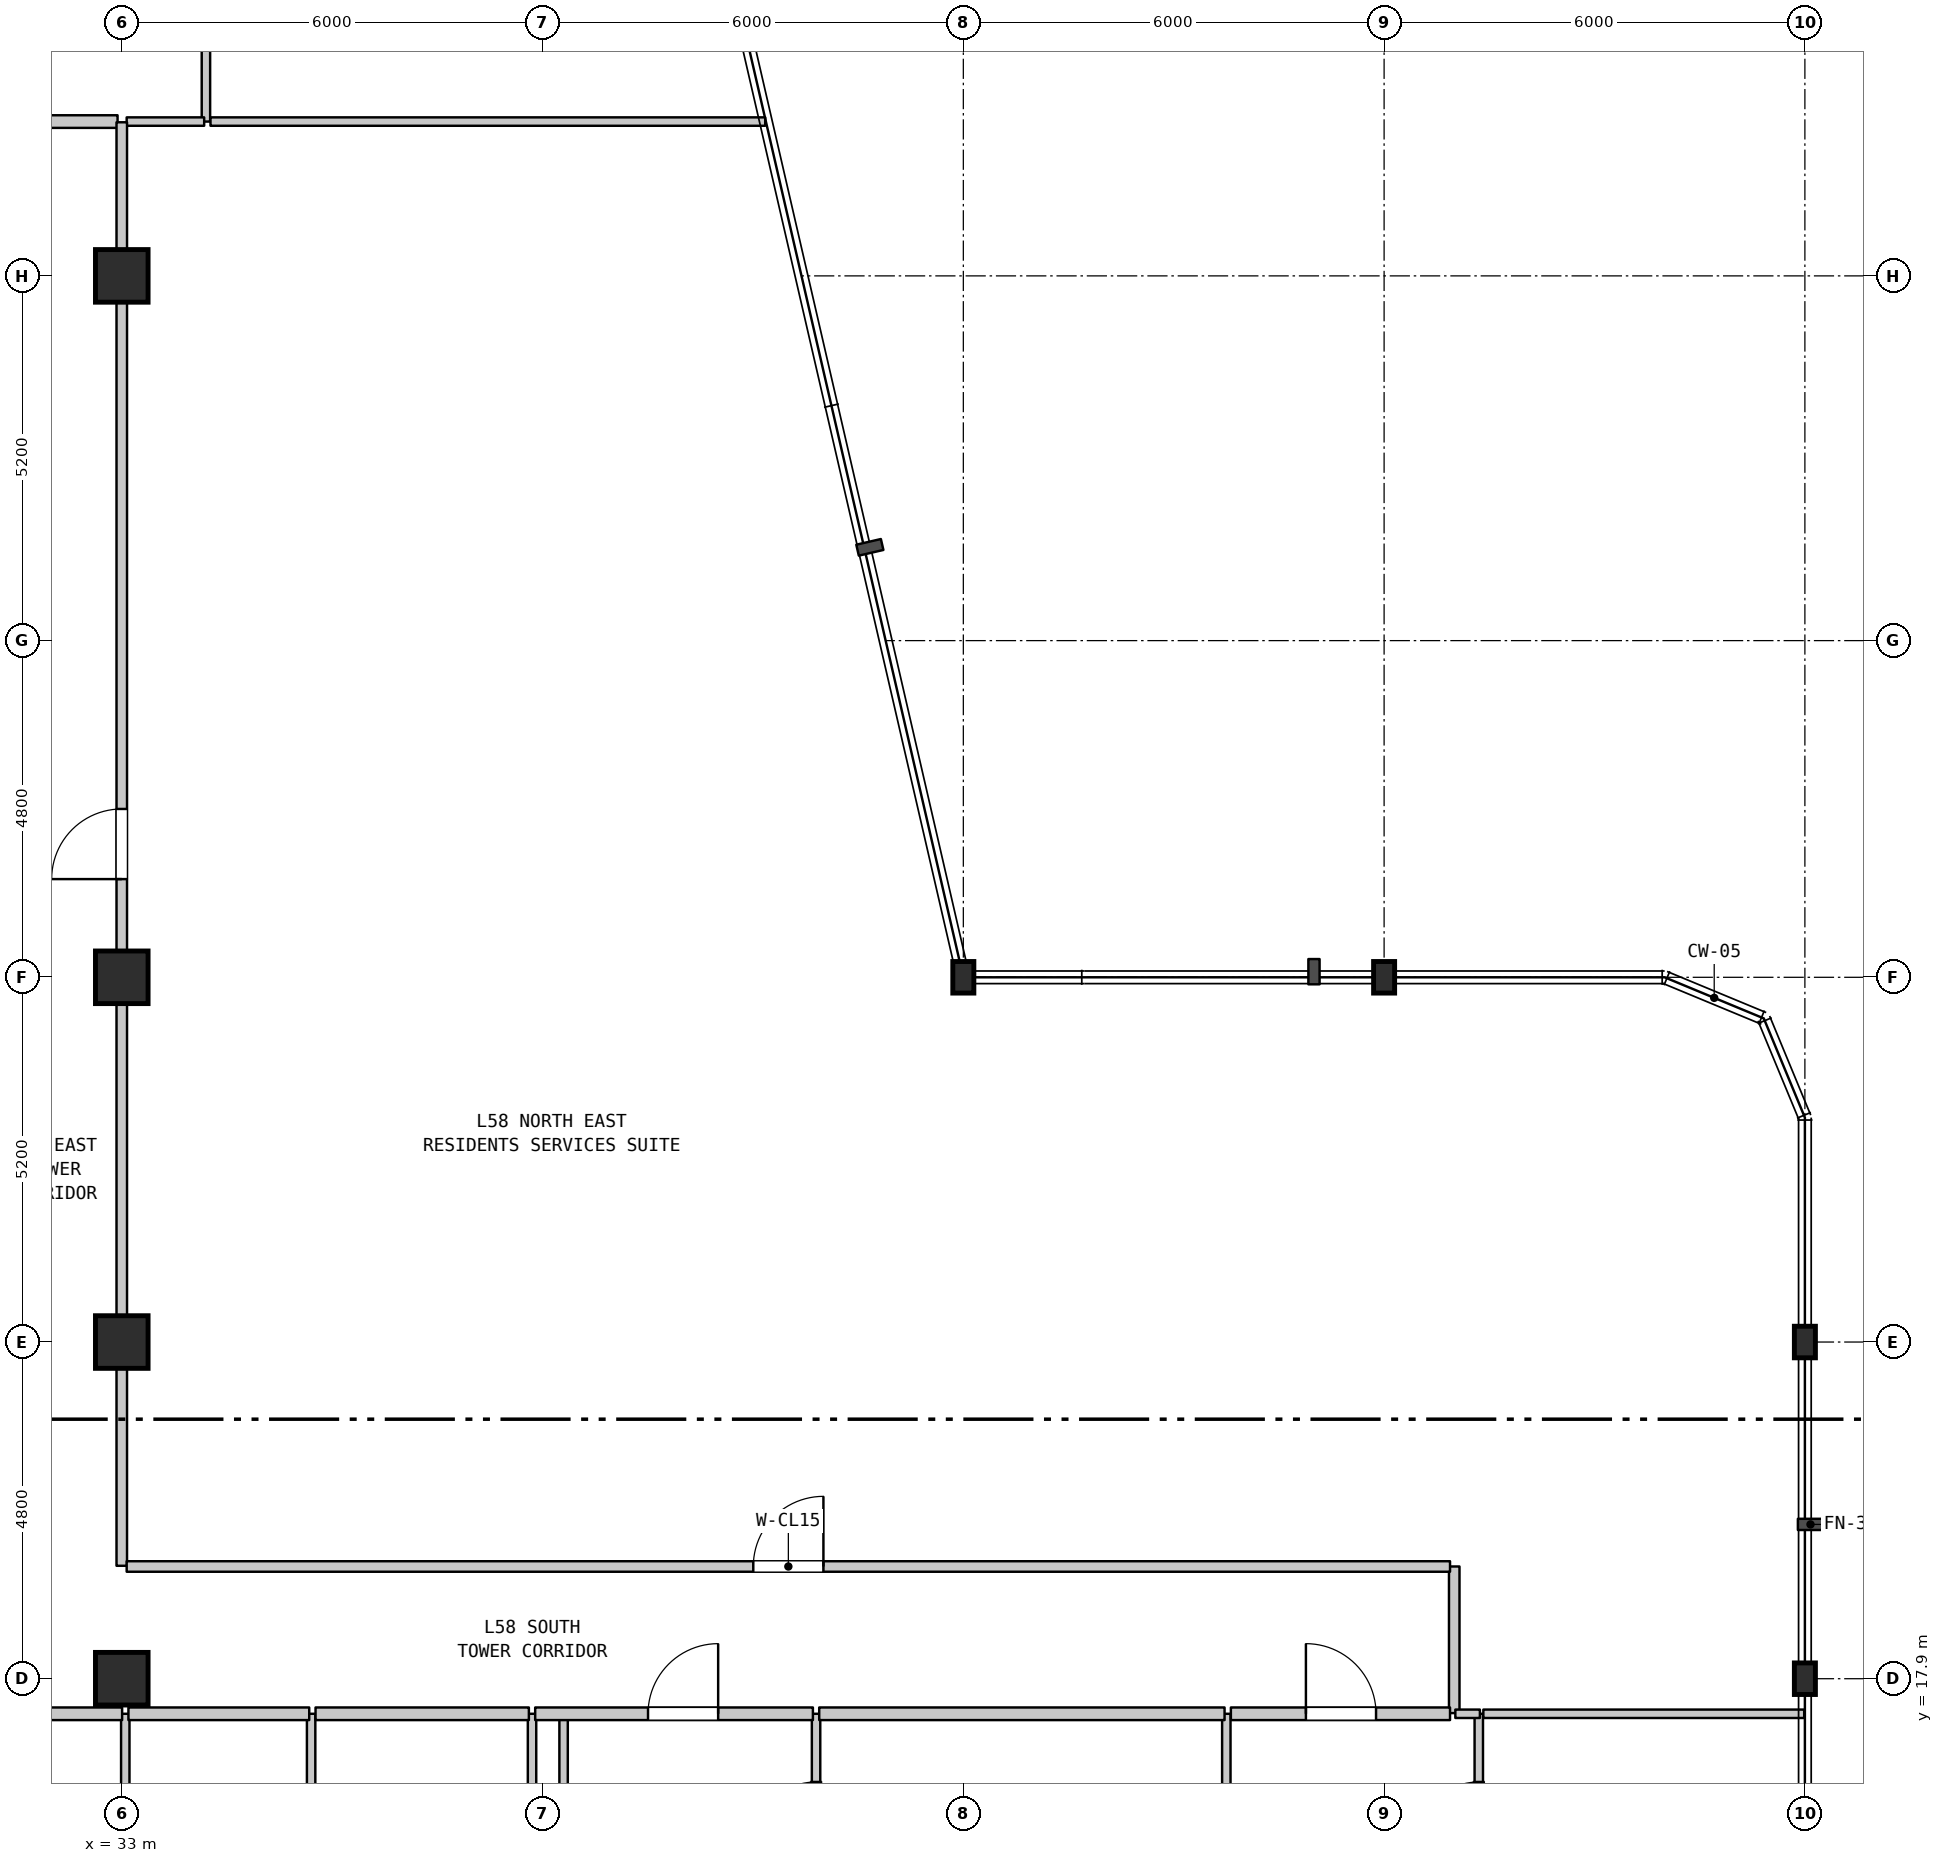
"""IFC4 building model, lengths in metres.
Left out: names, types, materials, properties, quantities, classifications, styles, units other than length and angle.
Written with IfcOpenShell. Run it as: python <this file> out.ifc"""

import sys

from ifc_helpers import new_model, si_unit, direction, frame, frame_2d, origin, origin_2d, place, context, subcontext, project, spatial, rectangle, i_section, extrude, element, fill, save


model = new_model("IFC4")
c1 = context("Model", 3, precision=1e-05, world=origin(), true_north=direction((0.0, 1.0)))
c2 = subcontext(c1, "Body", "Model", "MODEL_VIEW")
j1 = project(units=[si_unit("LENGTHUNIT", "METRE"), si_unit("PLANEANGLEUNIT", "RADIAN")], contexts=[c1])
p1 = place(None, origin())
s1 = spatial("IfcSite", under=j1, at=p1, CompositionType="ELEMENT")
p2 = place(p1, origin())
s2 = spatial("IfcBuilding", under=s1, at=p2, CompositionType="ELEMENT")
p3 = place(p2, frame((0.0, 0.0, 233.9)))
s3 = spatial("IfcBuildingStorey", under=s2, at=p3, CompositionType="ELEMENT", Elevation=233.9)
for number, where, z_axis, x_axis in (
    (1, (33.0, 17.9, 0.0), (0.0, 0.0, 1.0), (1.0, 0.0, 0.0)),
    (2, (33.0, 22.7, 0.0), (0.0, 0.0, 1.0), (1.0, 0.0, 0.0)),
    (3, (33.0, 27.9, 0.0), (0.0, 0.0, 1.0), (1.0, 0.0, 0.0)),
    (4, (33.0, 37.9, 0.0), (0.0, 0.0, 1.0), (1.0, 0.0, 0.0)),
):
    element("IfcColumn", number, at=place(p3, frame(where, z_axis=z_axis, x_axis=x_axis)), inside=s3, PredefinedType="COLUMN", context=c2, shape_type="SweptSolid", body=[
        extrude(rectangle(XDim=0.75, YDim=0.75, at=origin_2d()), origin(), (0.0, 0.0, 1.0), 3.7),
    ])
for number, where, z_axis, x_axis in (
    (5, (45.0, 27.9, 0.0), (0.0, 0.0, 1.0), (1.0, 0.0, 0.0)),
    (6, (51.0, 27.9, 0.0), (0.0, 0.0, 1.0), (1.0, 0.0, 0.0)),
    (7, (57.0, 17.9, 0.0), (0.0, 0.0, 1.0), (1.0, 0.0, 0.0)),
    (8, (57.0, 22.7, 0.0), (0.0, 0.0, 1.0), (1.0, 0.0, 0.0)),
):
    element("IfcColumn", number, at=place(p3, frame(where, z_axis=z_axis, x_axis=x_axis)), inside=s3, PredefinedType="COLUMN", context=c2, shape_type="SweptSolid", body=[
        extrude(i_section(OverallWidth=0.3, OverallDepth=0.45, WebThickness=0.014, FlangeThickness=0.026, FilletRadius=0.027, at=origin_2d()), origin(), (0.0, 0.0, 1.0), 3.7),
    ])
p4 = place(p3, frame((33.0, 19.51, 0.0), z_axis=(0.0, 0.0, 1.0), x_axis=(0.0, 1.0, 0.0)))
e9 = element("IfcWall", 9, at=p4, inside=s3, PredefinedType="STANDARD", context=c2, shape_type="SweptSolid", body=[
    extrude(rectangle(XDim=18.39, YDim=0.15, at=frame_2d((9.195, 0.0))), origin(), (0.0, 0.0, 1.0), 2.78),
])
p5 = place(p4, frame((9.79, 0.0, 0.0)))
e10 = element("IfcOpeningElement", 10, at=p5, cuts=e9, PredefinedType="OPENING", context=c2, shape_type="SweptSolid", body=[
    extrude(rectangle(XDim=1.0, YDim=2.15, at=frame_2d((0.5, 1.075))), frame((0.0, 0.085, 0.0), z_axis=(0.0, -1.0, 0.0), x_axis=(1.0, 0.0, 0.0)), (0.0, 0.0, 1.0), 0.17),
])
p6 = place(p3, frame((33.05, 11.15, 0.0), z_axis=(0.0, 0.0, 1.0), x_axis=(0.0, 1.0, 0.0)))
e11 = element("IfcWall", 11, at=p6, inside=s3, PredefinedType="PARTITIONING", context=c2, shape_type="SweptSolid", body=[
    extrude(rectangle(XDim=6.25, YDim=0.12, at=frame_2d((3.125, 0.0))), origin(), (0.0, 0.0, 1.0), 2.78),
])
p7 = place(p3, frame((34.2, 40.1, 0.0), z_axis=(0.0, 0.0, 1.0), x_axis=(0.0, 1.0, 0.0)))
e12 = element("IfcWall", 12, at=p7, inside=s3, PredefinedType="PARTITIONING", context=c2, shape_type="SweptSolid", body=[
    extrude(rectangle(XDim=13.79, YDim=0.12, at=frame_2d((6.895, 0.0))), origin(), (0.0, 0.0, 1.0), 3.28),
])
p8 = place(p7, frame((1.852, 0.0, 0.0)))
e13 = element("IfcOpeningElement", 13, at=p8, cuts=e12, PredefinedType="OPENING", context=c2, shape_type="SweptSolid", body=[
    extrude(rectangle(XDim=0.9, YDim=2.15, at=frame_2d((0.45, 1.075))), frame((0.0, 0.07, 0.0), z_axis=(0.0, -1.0, 0.0), x_axis=(1.0, 0.0, 0.0)), (0.0, 0.0, 1.0), 0.14),
])
p9 = place(p7, frame((6.45, 0.0, 0.0)))
e14 = element("IfcOpeningElement", 14, at=p9, cuts=e12, PredefinedType="OPENING", context=c2, shape_type="SweptSolid", body=[
    extrude(rectangle(XDim=0.9, YDim=2.15, at=frame_2d((0.45, 1.075))), frame((0.0, 0.07, 0.0), z_axis=(0.0, -1.0, 0.0), x_axis=(1.0, 0.0, 0.0)), (0.0, 0.0, 1.0), 0.14),
])
p10 = place(p7, frame((10.898, 0.0, 0.0)))
e15 = element("IfcOpeningElement", 15, at=p10, cuts=e12, PredefinedType="OPENING", context=c2, shape_type="SweptSolid", body=[
    extrude(rectangle(XDim=0.9, YDim=2.15, at=frame_2d((0.45, 1.075))), frame((0.0, 0.07, 0.0), z_axis=(0.0, -1.0, 0.0), x_axis=(1.0, 0.0, 0.0)), (0.0, 0.0, 1.0), 0.14),
])
for number, where, z_axis, x_axis in (
    (16, (35.7, 11.15, 0.0), (0.0, 0.0, 1.0), (0.0, 1.0, 0.0)),
    (17, (38.85, 11.15, 0.0), (0.0, 0.0, 1.0), (0.0, 1.0, 0.0)),
):
    element("IfcWall", number, at=place(p3, frame(where, z_axis=z_axis, x_axis=x_axis)), inside=s3, PredefinedType="PARTITIONING", context=c2, shape_type="SweptSolid", body=[
        extrude(rectangle(XDim=6.25, YDim=0.12, at=frame_2d((3.125, 0.0))), origin(), (0.0, 0.0, 1.0), 3.28),
    ])
p11 = place(p3, frame((39.3, 0.71, 0.0), z_axis=(0.0, 0.0, 1.0), x_axis=(0.0, 1.0, 0.0)))
e18 = element("IfcWall", 18, at=p11, inside=s3, PredefinedType="PARTITIONING", context=c2, shape_type="SweptSolid", body=[
    extrude(rectangle(XDim=16.69, YDim=0.12, at=frame_2d((8.345, 0.0))), origin(), (0.0, 0.0, 1.0), 3.28),
])
p12 = place(p3, frame((42.9, 14.7, 0.0), z_axis=(0.0, 0.0, 1.0), x_axis=(0.0, 1.0, 0.0)))
e19 = element("IfcWall", 19, at=p12, inside=s3, PredefinedType="PARTITIONING", context=c2, shape_type="SweptSolid", body=[
    extrude(rectangle(XDim=2.7, YDim=0.12, at=frame_2d((1.35, 0.0))), origin(), (0.0, 0.0, 1.0), 3.28),
])
p13 = place(p12, frame((0.828, 0.0, 0.0)))
e20 = element("IfcOpeningElement", 20, at=p13, cuts=e19, PredefinedType="OPENING", context=c2, shape_type="SweptSolid", body=[
    extrude(rectangle(XDim=0.9, YDim=2.1, at=frame_2d((0.45, 1.05))), frame((0.0, 0.07, 0.0), z_axis=(0.0, -1.0, 0.0), x_axis=(1.0, 0.0, 0.0)), (0.0, 0.0, 1.0), 0.14),
])
p14 = place(p3, frame((48.75, 14.7, 0.0), z_axis=(0.0, 0.0, 1.0), x_axis=(0.0, 1.0, 0.0)))
e21 = element("IfcWall", 21, at=p14, inside=s3, PredefinedType="PARTITIONING", context=c2, shape_type="SweptSolid", body=[
    extrude(rectangle(XDim=2.7, YDim=0.12, at=frame_2d((1.35, 0.0))), origin(), (0.0, 0.0, 1.0), 3.28),
])
p15 = place(p3, frame((52.0, 17.41, 0.0), z_axis=(0.0, 0.0, 1.0), x_axis=(0.0, 1.0, 0.0)))
e22 = element("IfcWall", 22, at=p15, inside=s3, PredefinedType="STANDARD", context=c2, shape_type="SweptSolid", body=[
    extrude(rectangle(XDim=2.09, YDim=0.15, at=frame_2d((1.045, 0.0))), origin(), (0.0, 0.0, 1.0), 3.28),
])
p16 = place(p3, frame((52.35, 14.7, 0.0), z_axis=(0.0, 0.0, 1.0), x_axis=(0.0, 1.0, 0.0)))
e23 = element("IfcWall", 23, at=p16, inside=s3, PredefinedType="PARTITIONING", context=c2, shape_type="SweptSolid", body=[
    extrude(rectangle(XDim=2.7, YDim=0.12, at=frame_2d((1.35, 0.0))), origin(), (0.0, 0.0, 1.0), 3.28),
])
p17 = place(p16, frame((0.828, 0.0, 0.0)))
e24 = element("IfcOpeningElement", 24, at=p17, cuts=e23, PredefinedType="OPENING", context=c2, shape_type="SweptSolid", body=[
    extrude(rectangle(XDim=0.9, YDim=2.1, at=frame_2d((0.45, 1.05))), frame((0.0, 0.07, 0.0), z_axis=(0.0, -1.0, 0.0), x_axis=(1.0, 0.0, 0.0)), (0.0, 0.0, 1.0), 0.14),
])
p18 = place(p3, frame((29.045, 17.4, 0.0), z_axis=(0.0, 0.0, 1.0), x_axis=(1.0, 0.0, 0.0)))
e25 = element("IfcWall", 25, at=p18, inside=s3, PredefinedType="STANDARD", context=c2, shape_type="SweptSolid", body=[
    extrude(rectangle(XDim=3.96, YDim=0.18, at=frame_2d((1.98, 0.0))), origin(), (0.0, 0.0, 1.0), 3.28),
])
p19 = place(p18, frame((1.48, 0.0, 0.0)))
e26 = element("IfcOpeningElement", 26, at=p19, cuts=e25, PredefinedType="OPENING", context=c2, shape_type="SweptSolid", body=[
    extrude(rectangle(XDim=1.0, YDim=2.15, at=frame_2d((0.5, 1.075))), frame((0.0, 0.1, 0.0), z_axis=(0.0, -1.0, 0.0), x_axis=(1.0, 0.0, 0.0)), (0.0, 0.0, 1.0), 0.2),
])
p20 = place(p3, frame((33.095, 17.4, 0.0), z_axis=(0.0, 0.0, 1.0), x_axis=(1.0, 0.0, 0.0)))
e27 = element("IfcWall", 27, at=p20, inside=s3, PredefinedType="STANDARD", context=c2, shape_type="SweptSolid", body=[
    extrude(rectangle(XDim=2.578, YDim=0.18, at=frame_2d((1.289, 0.0))), origin(), (0.0, 0.0, 1.0), 3.28),
])
p21 = place(p3, frame((35.763, 17.4, 0.0), z_axis=(0.0, 0.0, 1.0), x_axis=(1.0, 0.0, 0.0)))
e28 = element("IfcWall", 28, at=p21, inside=s3, PredefinedType="STANDARD", context=c2, shape_type="SweptSolid", body=[
    extrude(rectangle(XDim=3.042, YDim=0.18, at=frame_2d((1.521, 0.0))), origin(), (0.0, 0.0, 1.0), 3.28),
])
p22 = place(p3, frame((38.895, 17.4, 0.0), z_axis=(0.0, 0.0, 1.0), x_axis=(1.0, 0.0, 0.0)))
e29 = element("IfcWall", 29, at=p22, inside=s3, PredefinedType="STANDARD", context=c2, shape_type="SweptSolid", body=[
    extrude(rectangle(XDim=3.96, YDim=0.18, at=frame_2d((1.98, 0.0))), origin(), (0.0, 0.0, 1.0), 3.28),
])
p23 = place(p22, frame((1.609, 0.0, 0.0)))
e30 = element("IfcOpeningElement", 30, at=p23, cuts=e29, PredefinedType="OPENING", context=c2, shape_type="SweptSolid", body=[
    extrude(rectangle(XDim=1.0, YDim=2.15, at=frame_2d((0.5, 1.075))), frame((0.0, 0.1, 0.0), z_axis=(0.0, -1.0, 0.0), x_axis=(1.0, 0.0, 0.0)), (0.0, 0.0, 1.0), 0.2),
])
p24 = place(p3, frame((42.945, 17.4, 0.0), z_axis=(0.0, 0.0, 1.0), x_axis=(1.0, 0.0, 0.0)))
e31 = element("IfcWall", 31, at=p24, inside=s3, PredefinedType="STANDARD", context=c2, shape_type="SweptSolid", body=[
    extrude(rectangle(XDim=5.78, YDim=0.18, at=frame_2d((2.89, 0.0))), origin(), (0.0, 0.0, 1.0), 3.28),
])
p25 = place(p3, frame((48.815, 17.4, 0.0), z_axis=(0.0, 0.0, 1.0), x_axis=(1.0, 0.0, 0.0)))
e32 = element("IfcWall", 32, at=p25, inside=s3, PredefinedType="STANDARD", context=c2, shape_type="SweptSolid", body=[
    extrude(rectangle(XDim=3.125, YDim=0.18, at=frame_2d((1.562, 0.0))), origin(), (0.0, 0.0, 1.0), 3.28),
])
p26 = place(p25, frame((1.07, 0.0, 0.0)))
e33 = element("IfcOpeningElement", 33, at=p26, cuts=e32, PredefinedType="OPENING", context=c2, shape_type="SweptSolid", body=[
    extrude(rectangle(XDim=1.0, YDim=2.15, at=frame_2d((0.5, 1.075))), frame((0.0, 0.1, 0.0), z_axis=(0.0, -1.0, 0.0), x_axis=(1.0, 0.0, 0.0)), (0.0, 0.0, 1.0), 0.2),
])
p27 = place(p3, frame((52.016, 17.4, 0.0), z_axis=(0.0, 0.0, 1.0), x_axis=(1.0, 0.0, 0.0)))
e34 = element("IfcWall", 34, at=p27, inside=s3, PredefinedType="PARTITIONING", context=c2, shape_type="SweptSolid", body=[
    extrude(rectangle(XDim=0.35, YDim=0.12, at=frame_2d((0.175, 0.0))), origin(), (0.0, 0.0, 1.0), 3.28),
])
p28 = place(p3, frame((52.415, 17.4, 0.0), z_axis=(0.0, 0.0, 1.0), x_axis=(1.0, 0.0, 0.0)))
e35 = element("IfcWall", 35, at=p28, inside=s3, PredefinedType="PARTITIONING", context=c2, shape_type="SweptSolid", body=[
    extrude(rectangle(XDim=4.575, YDim=0.12, at=frame_2d((2.288, 0.0))), origin(), (0.0, 0.0, 1.0), 3.28),
])
p29 = place(p3, frame((33.07, 19.5, 0.0), z_axis=(0.0, 0.0, 1.0), x_axis=(1.0, 0.0, 0.0)))
e36 = element("IfcWall", 36, at=p29, inside=s3, PredefinedType="STANDARD", context=c2, shape_type="SweptSolid", body=[
    extrude(rectangle(XDim=18.87, YDim=0.15, at=frame_2d((9.435, 0.0))), origin(), (0.0, 0.0, 1.0), 3.28),
])
p30 = place(p29, frame((8.935, 0.0, 0.0)))
e37 = element("IfcOpeningElement", 37, at=p30, cuts=e36, PredefinedType="OPENING", context=c2, shape_type="SweptSolid", body=[
    extrude(rectangle(XDim=1.0, YDim=2.15, at=frame_2d((0.5, 1.075))), frame((0.0, 0.085, 0.0), z_axis=(0.0, -1.0, 0.0), x_axis=(1.0, 0.0, 0.0)), (0.0, 0.0, 1.0), 0.17),
])
p31 = place(p3, frame((29.195, 40.1, 0.0), z_axis=(0.0, 0.0, 1.0), x_axis=(1.0, 0.0, 0.0)))
e38 = element("IfcWall", 38, at=p31, inside=s3, PredefinedType="STANDARD", context=c2, shape_type="SweptSolid", body=[
    extrude(rectangle(XDim=3.745, YDim=0.18, at=frame_2d((1.873, 0.0))), origin(), (0.0, 0.0, 1.0), 3.28),
])
p32 = place(p3, frame((33.07, 40.1, 0.0), z_axis=(0.0, 0.0, 1.0), x_axis=(1.0, 0.0, 0.0)))
e39 = element("IfcWall", 39, at=p32, inside=s3, PredefinedType="PARTITIONING", context=c2, shape_type="SweptSolid", body=[
    extrude(rectangle(XDim=1.105, YDim=0.12, at=frame_2d((0.552, 0.0))), origin(), (0.0, 0.0, 1.0), 3.28),
])
p33 = place(p3, frame((34.265, 40.1, 0.0), z_axis=(0.0, 0.0, 1.0), x_axis=(1.0, 0.0, 0.0)))
e40 = element("IfcWall", 40, at=p33, inside=s3, PredefinedType="PARTITIONING", context=c2, shape_type="SweptSolid", body=[
    extrude(rectangle(XDim=7.91, YDim=0.12, at=frame_2d((3.955, 0.0))), origin(), (0.0, 0.0, 1.0), 3.28),
])
p34 = place(p3, frame((33.0, 37.9, 0.0), z_axis=(0.0, 0.0, 1.0), x_axis=(0.0, 1.0, 0.0)))
e41 = element("IfcWall", 41, at=p34, inside=s3, PredefinedType="STANDARD", context=c2, shape_type="SweptSolid", body=[
    extrude(rectangle(XDim=2.19, YDim=0.15, at=frame_2d((1.095, 0.0))), origin(), (0.0, 0.0, 1.0), 2.68),
])
p35 = place(p5, origin())
e42 = element("IfcDoor", 42, at=p35, inside=s3, OperationType="SINGLE_SWING_LEFT", PredefinedType="DOOR", context=c2, shape_type="SweptSolid", body=[
    extrude(rectangle(XDim=1.0, YDim=2.15, at=frame_2d((0.5, 1.075))), frame((0.0, 0.025, 0.0), z_axis=(0.0, -1.0, 0.0), x_axis=(1.0, 0.0, 0.0)), (0.0, 0.0, 1.0), 0.05),
])
fill(e10, e42)
p36 = place(p13, origin())
e43 = element("IfcDoor", 43, at=p36, inside=s3, OperationType="SINGLE_SWING_LEFT", PredefinedType="DOOR", context=c2, shape_type="SweptSolid", body=[
    extrude(rectangle(XDim=0.9, YDim=2.1, at=frame_2d((0.45, 1.05))), frame((0.0, 0.025, 0.0), z_axis=(0.0, -1.0, 0.0), x_axis=(1.0, 0.0, 0.0)), (0.0, 0.0, 1.0), 0.05),
])
fill(e20, e43)
p37 = place(p17, origin())
e44 = element("IfcDoor", 44, at=p37, inside=s3, OperationType="SINGLE_SWING_LEFT", PredefinedType="DOOR", context=c2, shape_type="SweptSolid", body=[
    extrude(rectangle(XDim=0.9, YDim=2.1, at=frame_2d((0.45, 1.05))), frame((0.0, 0.025, 0.0), z_axis=(0.0, -1.0, 0.0), x_axis=(1.0, 0.0, 0.0)), (0.0, 0.0, 1.0), 0.05),
])
fill(e24, e44)
p38 = place(p23, origin())
e45 = element("IfcDoor", 45, at=p38, inside=s3, OperationType="SINGLE_SWING_RIGHT", PredefinedType="DOOR", context=c2, shape_type="SweptSolid", body=[
    extrude(rectangle(XDim=1.0, YDim=2.15, at=frame_2d((0.5, 1.075))), frame((0.0, 0.025, 0.0), z_axis=(0.0, -1.0, 0.0), x_axis=(1.0, 0.0, 0.0)), (0.0, 0.0, 1.0), 0.05),
])
fill(e30, e45)
p39 = place(p26, origin())
e46 = element("IfcDoor", 46, at=p39, inside=s3, OperationType="SINGLE_SWING_LEFT", PredefinedType="DOOR", context=c2, shape_type="SweptSolid", body=[
    extrude(rectangle(XDim=1.0, YDim=2.15, at=frame_2d((0.5, 1.075))), frame((0.0, 0.025, 0.0), z_axis=(0.0, -1.0, 0.0), x_axis=(1.0, 0.0, 0.0)), (0.0, 0.0, 1.0), 0.05),
])
fill(e33, e46)
p40 = place(p30, origin())
e47 = element("IfcDoor", 47, at=p40, inside=s3, OperationType="SINGLE_SWING_RIGHT", PredefinedType="DOOR", context=c2, shape_type="SweptSolid", body=[
    extrude(rectangle(XDim=1.0, YDim=2.15, at=frame_2d((0.5, 1.075))), frame((0.0, 0.025, 0.0), z_axis=(0.0, -1.0, 0.0), x_axis=(1.0, 0.0, 0.0)), (0.0, 0.0, 1.0), 0.05),
])
fill(e37, e47)
save(model, sys.argv[1])
